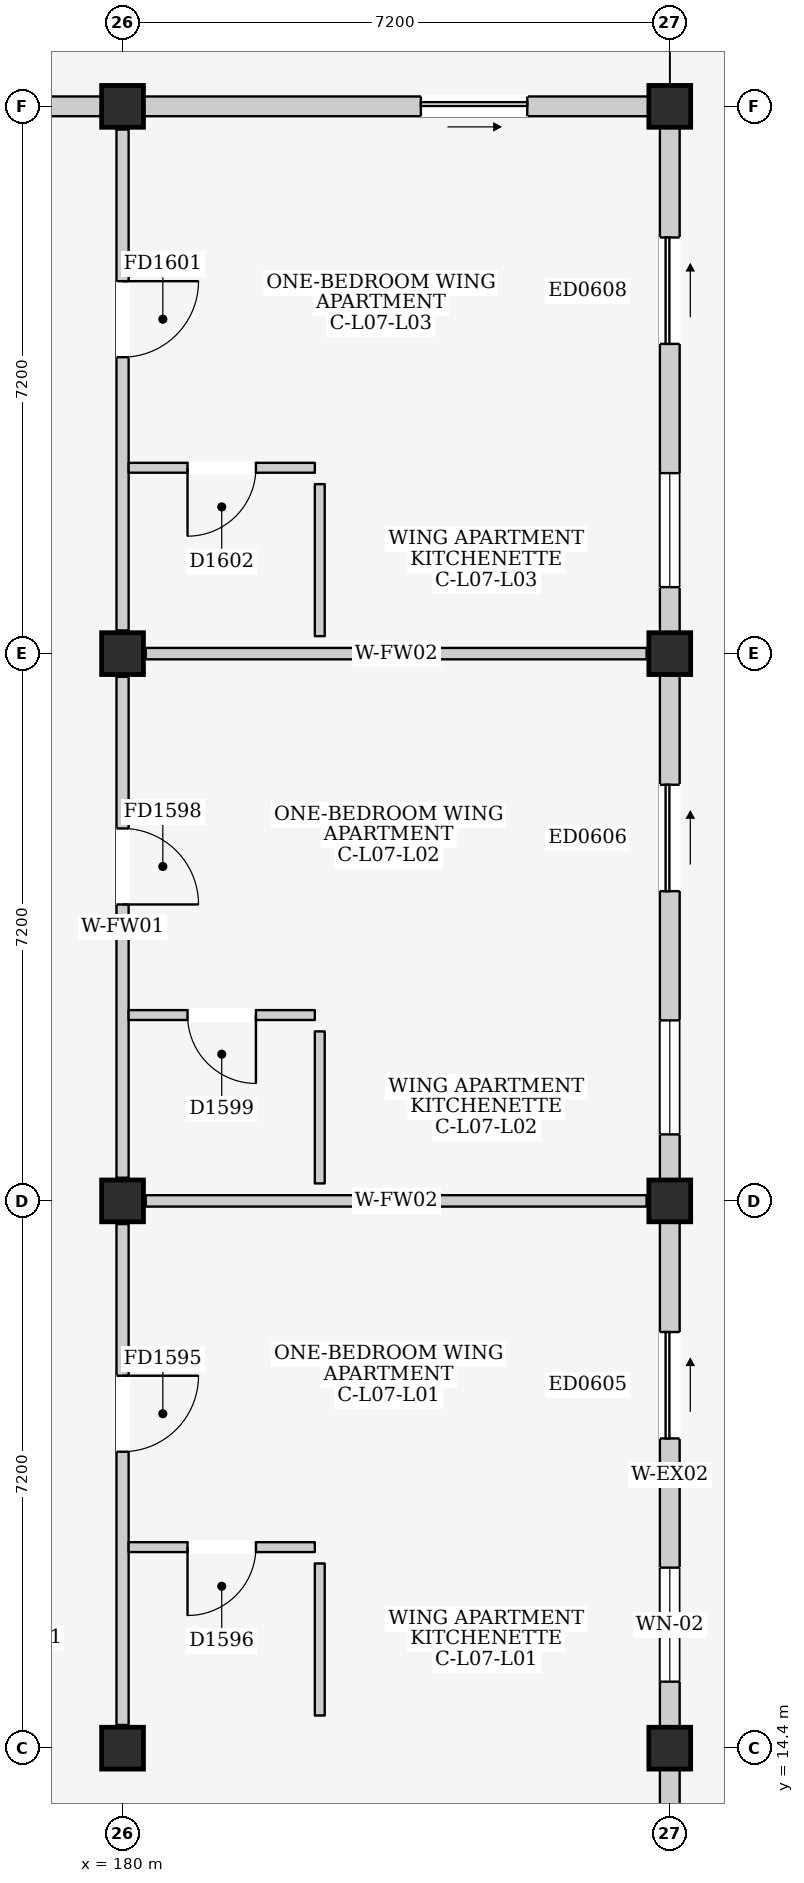
"""IFC4 building model, lengths in metres.
Left out: names, types, materials, properties, quantities, classifications, styles, units other than length and angle.
Written with IfcOpenShell. Run it as: python <this file> out.ifc"""

import sys

from ifc_helpers import new_model, si_unit, direction, frame, frame_2d, origin, origin_2d, place, context, subcontext, project, spatial, rectangle, extrude, element, fill, save


model = new_model("IFC4")
c1 = context("Model", 3, precision=1e-05, world=origin(), true_north=direction((0.0, 1.0)))
c2 = subcontext(c1, "Body", "Model", "MODEL_VIEW")
j1 = project(units=[si_unit("LENGTHUNIT", "METRE"), si_unit("PLANEANGLEUNIT", "RADIAN")], contexts=[c1])
p1 = place(None, origin())
s1 = spatial("IfcSite", under=j1, at=p1, CompositionType="ELEMENT")
p2 = place(p1, origin())
s2 = spatial("IfcBuilding", under=s1, at=p2, CompositionType="ELEMENT")
p3 = place(p2, frame((0.0, 0.0, 25.1)))
s3 = spatial("IfcBuildingStorey", under=s2, at=p3, CompositionType="ELEMENT", Elevation=25.1)
for number, where, z_axis, x_axis in (
    (1, (180.0, 14.4, 0.0), (0.0, 0.0, 1.0), (1.0, 0.0, 0.0)),
    (2, (180.0, 21.6, 0.0), (0.0, 0.0, 1.0), (1.0, 0.0, 0.0)),
    (3, (180.0, 28.8, 0.0), (0.0, 0.0, 1.0), (1.0, 0.0, 0.0)),
    (4, (180.0, 36.0, 0.0), (0.0, 0.0, 1.0), (1.0, 0.0, 0.0)),
    (5, (187.2, 14.4, 0.0), (0.0, 0.0, 1.0), (1.0, 0.0, 0.0)),
    (6, (187.2, 21.6, 0.0), (0.0, 0.0, 1.0), (1.0, 0.0, 0.0)),
    (7, (187.2, 28.8, 0.0), (0.0, 0.0, 1.0), (1.0, 0.0, 0.0)),
    (8, (187.2, 36.0, 0.0), (0.0, 0.0, 1.0), (1.0, 0.0, 0.0)),
):
    element("IfcColumn", number, at=place(p3, frame(where, z_axis=z_axis, x_axis=x_axis)), inside=s3, PredefinedType="COLUMN", context=c2, shape_type="SweptSolid", body=[
        extrude(rectangle(XDim=0.55, YDim=0.55, at=origin_2d()), origin(), (0.0, 0.0, 1.0), 3.2),
    ])
p4 = place(p3, frame((173.075, 36.0, 0.0), z_axis=(0.0, 0.0, 1.0), x_axis=(1.0, 0.0, 0.0)))
e9 = element("IfcWall", 9, at=p4, inside=s3, PredefinedType="ELEMENTEDWALL", context=c2, shape_type="SweptSolid", body=[
    extrude(rectangle(XDim=6.65, YDim=0.26, at=frame_2d((3.325, 0.0))), origin(), (0.0, 0.0, 1.0), 2.375),
])
p5 = place(p4, frame((2.825, 0.0, 1.1)))
e10 = element("IfcOpeningElement", 10, at=p5, cuts=e9, PredefinedType="OPENING", context=c2, shape_type="SweptSolid", body=[
    extrude(rectangle(XDim=1.0, YDim=0.9, at=frame_2d((0.5, 0.45))), frame((0.0, 0.145, 0.0), z_axis=(0.0, -1.0, 0.0), x_axis=(1.0, 0.0, 0.0)), (0.0, 0.0, 1.0), 0.29),
])
p6 = place(p3, frame((187.2, 7.475, 0.0), z_axis=(0.0, 0.0, 1.0), x_axis=(0.0, 1.0, 0.0)))
e11 = element("IfcWall", 11, at=p6, inside=s3, PredefinedType="ELEMENTEDWALL", context=c2, shape_type="SweptSolid", body=[
    extrude(rectangle(XDim=6.65, YDim=0.26, at=frame_2d((3.325, 0.0))), origin(), (0.0, 0.0, 1.0), 2.525),
])
p7 = place(p6, frame((3.65, 0.0, 0.0)))
e12 = element("IfcOpeningElement", 12, at=p7, cuts=e11, PredefinedType="OPENING", context=c2, shape_type="SweptSolid", body=[
    extrude(rectangle(XDim=1.4, YDim=2.1, at=frame_2d((0.7, 1.05))), frame((0.0, 0.145, 0.0), z_axis=(0.0, -1.0, 0.0), x_axis=(1.0, 0.0, 0.0)), (0.0, 0.0, 1.0), 0.29),
])
p8 = place(p3, frame((187.2, 14.675, 0.0), z_axis=(0.0, 0.0, 1.0), x_axis=(0.0, 1.0, 0.0)))
e13 = element("IfcWall", 13, at=p8, inside=s3, PredefinedType="ELEMENTEDWALL", context=c2, shape_type="SweptSolid", body=[
    extrude(rectangle(XDim=6.65, YDim=0.26, at=frame_2d((3.325, 0.0))), origin(), (0.0, 0.0, 1.0), 2.525),
])
p9 = place(p8, frame((3.8, 0.0, 0.0)))
e14 = element("IfcOpeningElement", 14, at=p9, cuts=e13, PredefinedType="OPENING", context=c2, shape_type="SweptSolid", body=[
    extrude(rectangle(XDim=1.4, YDim=2.1, at=frame_2d((0.7, 1.05))), frame((0.0, 0.145, 0.0), z_axis=(0.0, -1.0, 0.0), x_axis=(1.0, 0.0, 0.0)), (0.0, 0.0, 1.0), 0.29),
])
p10 = place(p8, frame((0.6, 0.0, 0.915)))
e15 = element("IfcOpeningElement", 15, at=p10, cuts=e13, PredefinedType="OPENING", context=c2, shape_type="SweptSolid", body=[
    extrude(rectangle(XDim=1.5, YDim=1.5, at=frame_2d((0.75, 0.75))), frame((0.0, 0.145, 0.0), z_axis=(0.0, -1.0, 0.0), x_axis=(1.0, 0.0, 0.0)), (0.0, 0.0, 1.0), 0.29),
])
p11 = place(p3, frame((187.2, 21.875, 0.0), z_axis=(0.0, 0.0, 1.0), x_axis=(0.0, 1.0, 0.0)))
e16 = element("IfcWall", 16, at=p11, inside=s3, PredefinedType="ELEMENTEDWALL", context=c2, shape_type="SweptSolid", body=[
    extrude(rectangle(XDim=6.65, YDim=0.26, at=frame_2d((3.325, 0.0))), origin(), (0.0, 0.0, 1.0), 2.525),
])
p12 = place(p11, frame((3.8, 0.0, 0.0)))
e17 = element("IfcOpeningElement", 17, at=p12, cuts=e16, PredefinedType="OPENING", context=c2, shape_type="SweptSolid", body=[
    extrude(rectangle(XDim=1.4, YDim=2.1, at=frame_2d((0.7, 1.05))), frame((0.0, 0.145, 0.0), z_axis=(0.0, -1.0, 0.0), x_axis=(1.0, 0.0, 0.0)), (0.0, 0.0, 1.0), 0.29),
])
p13 = place(p11, frame((0.6, 0.0, 0.915)))
e18 = element("IfcOpeningElement", 18, at=p13, cuts=e16, PredefinedType="OPENING", context=c2, shape_type="SweptSolid", body=[
    extrude(rectangle(XDim=1.5, YDim=1.5, at=frame_2d((0.75, 0.75))), frame((0.0, 0.145, 0.0), z_axis=(0.0, -1.0, 0.0), x_axis=(1.0, 0.0, 0.0)), (0.0, 0.0, 1.0), 0.29),
])
p14 = place(p3, frame((180.275, 36.0, 0.0), z_axis=(0.0, 0.0, 1.0), x_axis=(1.0, 0.0, 0.0)))
e19 = element("IfcWall", 19, at=p14, inside=s3, PredefinedType="ELEMENTEDWALL", context=c2, shape_type="SweptSolid", body=[
    extrude(rectangle(XDim=6.65, YDim=0.26, at=frame_2d((3.325, 0.0))), origin(), (0.0, 0.0, 1.0), 2.375),
])
p15 = place(p14, frame((3.65, 0.0, 0.0)))
e20 = element("IfcOpeningElement", 20, at=p15, cuts=e19, PredefinedType="OPENING", context=c2, shape_type="SweptSolid", body=[
    extrude(rectangle(XDim=1.4, YDim=2.1, at=frame_2d((0.7, 1.05))), frame((0.0, 0.145, 0.0), z_axis=(0.0, -1.0, 0.0), x_axis=(1.0, 0.0, 0.0)), (0.0, 0.0, 1.0), 0.29),
])
p16 = place(p3, frame((187.2, 29.075, 0.0), z_axis=(0.0, 0.0, 1.0), x_axis=(0.0, 1.0, 0.0)))
e21 = element("IfcWall", 21, at=p16, inside=s3, PredefinedType="ELEMENTEDWALL", context=c2, shape_type="SweptSolid", body=[
    extrude(rectangle(XDim=6.65, YDim=0.26, at=frame_2d((3.325, 0.0))), origin(), (0.0, 0.0, 1.0), 2.525),
])
p17 = place(p16, frame((3.8, 0.0, 0.0)))
e22 = element("IfcOpeningElement", 22, at=p17, cuts=e21, PredefinedType="OPENING", context=c2, shape_type="SweptSolid", body=[
    extrude(rectangle(XDim=1.4, YDim=2.1, at=frame_2d((0.7, 1.05))), frame((0.0, 0.145, 0.0), z_axis=(0.0, -1.0, 0.0), x_axis=(1.0, 0.0, 0.0)), (0.0, 0.0, 1.0), 0.29),
])
p18 = place(p16, frame((0.6, 0.0, 0.915)))
e23 = element("IfcOpeningElement", 23, at=p18, cuts=e21, PredefinedType="OPENING", context=c2, shape_type="SweptSolid", body=[
    extrude(rectangle(XDim=1.5, YDim=1.5, at=frame_2d((0.75, 0.75))), frame((0.0, 0.145, 0.0), z_axis=(0.0, -1.0, 0.0), x_axis=(1.0, 0.0, 0.0)), (0.0, 0.0, 1.0), 0.29),
])
p19 = place(p3, frame((180.0, 14.705, 0.0), z_axis=(0.0, 0.0, 1.0), x_axis=(0.0, 1.0, 0.0)))
e24 = element("IfcWall", 24, at=p19, inside=s3, PredefinedType="PARTITIONING", context=c2, shape_type="SweptSolid", body=[
    extrude(rectangle(XDim=6.59, YDim=0.16, at=frame_2d((3.295, 0.0))), origin(), (0.0, 0.0, 1.0), 2.475),
])
p20 = place(p19, frame((3.595, 0.0, 0.0)))
e25 = element("IfcOpeningElement", 25, at=p20, cuts=e24, PredefinedType="OPENING", context=c2, shape_type="SweptSolid", body=[
    extrude(rectangle(XDim=1.0, YDim=2.15, at=frame_2d((0.5, 1.075))), frame((0.0, 0.095, 0.0), z_axis=(0.0, -1.0, 0.0), x_axis=(1.0, 0.0, 0.0)), (0.0, 0.0, 1.0), 0.19),
])
p21 = place(p3, frame((180.305, 21.6, 0.0), z_axis=(0.0, 0.0, 1.0), x_axis=(1.0, 0.0, 0.0)))
e26 = element("IfcWall", 26, at=p21, inside=s3, PredefinedType="PARTITIONING", context=c2, shape_type="SweptSolid", body=[
    extrude(rectangle(XDim=6.59, YDim=0.15, at=frame_2d((3.295, 0.0))), origin(), (0.0, 0.0, 1.0), 2.375),
])
p22 = place(p3, frame((180.08, 17.045, 0.0), z_axis=(0.0, 0.0, 1.0), x_axis=(1.0, 0.0, 0.0)))
e27 = element("IfcWall", 27, at=p22, inside=s3, PredefinedType="PARTITIONING", context=c2, shape_type="SweptSolid", body=[
    extrude(rectangle(XDim=2.45, YDim=0.13, at=frame_2d((1.225, 0.0))), origin(), (0.0, 0.0, 1.0), 2.99),
])
p23 = place(p22, frame((0.775, 0.0, 0.0)))
e28 = element("IfcOpeningElement", 28, at=p23, cuts=e27, PredefinedType="OPENING", context=c2, shape_type="SweptSolid", body=[
    extrude(rectangle(XDim=0.9, YDim=2.1, at=frame_2d((0.45, 1.05))), frame((0.0, 0.08, 0.0), z_axis=(0.0, -1.0, 0.0), x_axis=(1.0, 0.0, 0.0)), (0.0, 0.0, 1.0), 0.16),
])
p24 = place(p3, frame((182.595, 14.83, 0.0), z_axis=(0.0, 0.0, 1.0), x_axis=(0.0, 1.0, 0.0)))
e29 = element("IfcWall", 29, at=p24, inside=s3, PredefinedType="PARTITIONING", context=c2, shape_type="SweptSolid", body=[
    extrude(rectangle(XDim=2.0, YDim=0.13, at=frame_2d((1.0, 0.0))), origin(), (0.0, 0.0, 1.0), 2.99),
])
p25 = place(p3, frame((180.0, 21.905, 0.0), z_axis=(0.0, 0.0, 1.0), x_axis=(0.0, 1.0, 0.0)))
e30 = element("IfcWall", 30, at=p25, inside=s3, PredefinedType="PARTITIONING", context=c2, shape_type="SweptSolid", body=[
    extrude(rectangle(XDim=6.59, YDim=0.16, at=frame_2d((3.295, 0.0))), origin(), (0.0, 0.0, 1.0), 2.475),
])
p26 = place(p25, frame((3.595, 0.0, 0.0)))
e31 = element("IfcOpeningElement", 31, at=p26, cuts=e30, PredefinedType="OPENING", context=c2, shape_type="SweptSolid", body=[
    extrude(rectangle(XDim=1.0, YDim=2.15, at=frame_2d((0.5, 1.075))), frame((0.0, 0.095, 0.0), z_axis=(0.0, -1.0, 0.0), x_axis=(1.0, 0.0, 0.0)), (0.0, 0.0, 1.0), 0.19),
])
p27 = place(p3, frame((180.305, 28.8, 0.0), z_axis=(0.0, 0.0, 1.0), x_axis=(1.0, 0.0, 0.0)))
e32 = element("IfcWall", 32, at=p27, inside=s3, PredefinedType="PARTITIONING", context=c2, shape_type="SweptSolid", body=[
    extrude(rectangle(XDim=6.59, YDim=0.15, at=frame_2d((3.295, 0.0))), origin(), (0.0, 0.0, 1.0), 2.375),
])
p28 = place(p3, frame((180.08, 24.045, 0.0), z_axis=(0.0, 0.0, 1.0), x_axis=(1.0, 0.0, 0.0)))
e33 = element("IfcWall", 33, at=p28, inside=s3, PredefinedType="PARTITIONING", context=c2, shape_type="SweptSolid", body=[
    extrude(rectangle(XDim=2.45, YDim=0.13, at=frame_2d((1.225, 0.0))), origin(), (0.0, 0.0, 1.0), 2.99),
])
p29 = place(p28, frame((0.775, 0.0, 0.0)))
e34 = element("IfcOpeningElement", 34, at=p29, cuts=e33, PredefinedType="OPENING", context=c2, shape_type="SweptSolid", body=[
    extrude(rectangle(XDim=0.9, YDim=2.1, at=frame_2d((0.45, 1.05))), frame((0.0, 0.08, 0.0), z_axis=(0.0, -1.0, 0.0), x_axis=(1.0, 0.0, 0.0)), (0.0, 0.0, 1.0), 0.16),
])
p30 = place(p3, frame((182.595, 21.83, 0.0), z_axis=(0.0, 0.0, 1.0), x_axis=(0.0, 1.0, 0.0)))
e35 = element("IfcWall", 35, at=p30, inside=s3, PredefinedType="PARTITIONING", context=c2, shape_type="SweptSolid", body=[
    extrude(rectangle(XDim=2.0, YDim=0.13, at=frame_2d((1.0, 0.0))), origin(), (0.0, 0.0, 1.0), 2.99),
])
p31 = place(p3, frame((180.0, 29.105, 0.0), z_axis=(0.0, 0.0, 1.0), x_axis=(0.0, 1.0, 0.0)))
e36 = element("IfcWall", 36, at=p31, inside=s3, PredefinedType="PARTITIONING", context=c2, shape_type="SweptSolid", body=[
    extrude(rectangle(XDim=6.59, YDim=0.16, at=frame_2d((3.295, 0.0))), origin(), (0.0, 0.0, 1.0), 2.475),
])
p32 = place(p31, frame((3.595, 0.0, 0.0)))
e37 = element("IfcOpeningElement", 37, at=p32, cuts=e36, PredefinedType="OPENING", context=c2, shape_type="SweptSolid", body=[
    extrude(rectangle(XDim=1.0, YDim=2.15, at=frame_2d((0.5, 1.075))), frame((0.0, 0.095, 0.0), z_axis=(0.0, -1.0, 0.0), x_axis=(1.0, 0.0, 0.0)), (0.0, 0.0, 1.0), 0.19),
])
p33 = place(p3, frame((180.08, 31.245, 0.0), z_axis=(0.0, 0.0, 1.0), x_axis=(1.0, 0.0, 0.0)))
e38 = element("IfcWall", 38, at=p33, inside=s3, PredefinedType="PARTITIONING", context=c2, shape_type="SweptSolid", body=[
    extrude(rectangle(XDim=2.45, YDim=0.13, at=frame_2d((1.225, 0.0))), origin(), (0.0, 0.0, 1.0), 2.99),
])
p34 = place(p33, frame((0.775, 0.0, 0.0)))
e39 = element("IfcOpeningElement", 39, at=p34, cuts=e38, PredefinedType="OPENING", context=c2, shape_type="SweptSolid", body=[
    extrude(rectangle(XDim=0.9, YDim=2.1, at=frame_2d((0.45, 1.05))), frame((0.0, 0.08, 0.0), z_axis=(0.0, -1.0, 0.0), x_axis=(1.0, 0.0, 0.0)), (0.0, 0.0, 1.0), 0.16),
])
p35 = place(p3, frame((182.595, 29.03, 0.0), z_axis=(0.0, 0.0, 1.0), x_axis=(0.0, 1.0, 0.0)))
e40 = element("IfcWall", 40, at=p35, inside=s3, PredefinedType="PARTITIONING", context=c2, shape_type="SweptSolid", body=[
    extrude(rectangle(XDim=2.0, YDim=0.13, at=frame_2d((1.0, 0.0))), origin(), (0.0, 0.0, 1.0), 2.99),
])
p36 = place(p9, frame((1.4, 0.0, 0.0), z_axis=(0.0, 0.0, 1.0), x_axis=(-1.0, 0.0, 0.0)))
e41 = element("IfcDoor", 41, at=p36, inside=s3, OperationType="SLIDING_TO_RIGHT", PredefinedType="DOOR", context=c2, shape_type="SweptSolid", body=[
    extrude(rectangle(XDim=1.4, YDim=2.1, at=frame_2d((0.7, 1.05))), frame((0.0, 0.025, 0.0), z_axis=(0.0, -1.0, 0.0), x_axis=(1.0, 0.0, 0.0)), (0.0, 0.0, 1.0), 0.05),
])
fill(e14, e41)
p37 = place(p10, origin())
e42 = element("IfcWindow", 42, at=p37, inside=s3, PartitioningType="DOUBLE_PANEL_VERTICAL", PredefinedType="WINDOW", context=c2, shape_type="SweptSolid", body=[
    extrude(rectangle(XDim=1.5, YDim=1.5, at=frame_2d((0.75, 0.75))), frame((0.0, 0.03, 0.0), z_axis=(0.0, -1.0, 0.0), x_axis=(1.0, 0.0, 0.0)), (0.0, 0.0, 1.0), 0.06),
])
fill(e15, e42)
p38 = place(p12, frame((1.4, 0.0, 0.0), z_axis=(0.0, 0.0, 1.0), x_axis=(-1.0, 0.0, 0.0)))
e43 = element("IfcDoor", 43, at=p38, inside=s3, OperationType="SLIDING_TO_RIGHT", PredefinedType="DOOR", context=c2, shape_type="SweptSolid", body=[
    extrude(rectangle(XDim=1.4, YDim=2.1, at=frame_2d((0.7, 1.05))), frame((0.0, 0.025, 0.0), z_axis=(0.0, -1.0, 0.0), x_axis=(1.0, 0.0, 0.0)), (0.0, 0.0, 1.0), 0.05),
])
fill(e17, e43)
p39 = place(p13, origin())
e44 = element("IfcWindow", 44, at=p39, inside=s3, PartitioningType="DOUBLE_PANEL_VERTICAL", PredefinedType="WINDOW", context=c2, shape_type="SweptSolid", body=[
    extrude(rectangle(XDim=1.5, YDim=1.5, at=frame_2d((0.75, 0.75))), frame((0.0, 0.03, 0.0), z_axis=(0.0, -1.0, 0.0), x_axis=(1.0, 0.0, 0.0)), (0.0, 0.0, 1.0), 0.06),
])
fill(e18, e44)
p40 = place(p15, frame((1.4, 0.0, 0.0), z_axis=(0.0, 0.0, 1.0), x_axis=(-1.0, 0.0, 0.0)))
e45 = element("IfcDoor", 45, at=p40, inside=s3, OperationType="SLIDING_TO_RIGHT", PredefinedType="DOOR", context=c2, shape_type="SweptSolid", body=[
    extrude(rectangle(XDim=1.4, YDim=2.1, at=frame_2d((0.7, 1.05))), frame((0.0, 0.025, 0.0), z_axis=(0.0, -1.0, 0.0), x_axis=(1.0, 0.0, 0.0)), (0.0, 0.0, 1.0), 0.05),
])
fill(e20, e45)
p41 = place(p17, frame((1.4, 0.0, 0.0), z_axis=(0.0, 0.0, 1.0), x_axis=(-1.0, 0.0, 0.0)))
e46 = element("IfcDoor", 46, at=p41, inside=s3, OperationType="SLIDING_TO_RIGHT", PredefinedType="DOOR", context=c2, shape_type="SweptSolid", body=[
    extrude(rectangle(XDim=1.4, YDim=2.1, at=frame_2d((0.7, 1.05))), frame((0.0, 0.025, 0.0), z_axis=(0.0, -1.0, 0.0), x_axis=(1.0, 0.0, 0.0)), (0.0, 0.0, 1.0), 0.05),
])
fill(e22, e46)
p42 = place(p18, origin())
e47 = element("IfcWindow", 47, at=p42, inside=s3, PartitioningType="DOUBLE_PANEL_VERTICAL", PredefinedType="WINDOW", context=c2, shape_type="SweptSolid", body=[
    extrude(rectangle(XDim=1.5, YDim=1.5, at=frame_2d((0.75, 0.75))), frame((0.0, 0.03, 0.0), z_axis=(0.0, -1.0, 0.0), x_axis=(1.0, 0.0, 0.0)), (0.0, 0.0, 1.0), 0.06),
])
fill(e23, e47)
p43 = place(p20, frame((1.0, 0.0, 0.0), z_axis=(0.0, 0.0, 1.0), x_axis=(-1.0, 0.0, 0.0)))
e48 = element("IfcDoor", 48, at=p43, inside=s3, OperationType="SINGLE_SWING_LEFT", PredefinedType="DOOR", context=c2, shape_type="SweptSolid", body=[
    extrude(rectangle(XDim=1.0, YDim=2.15, at=frame_2d((0.5, 1.075))), frame((0.0, 0.025, 0.0), z_axis=(0.0, -1.0, 0.0), x_axis=(1.0, 0.0, 0.0)), (0.0, 0.0, 1.0), 0.05),
])
fill(e25, e48)
p44 = place(p23, frame((0.9, 0.0, 0.0), z_axis=(0.0, 0.0, 1.0), x_axis=(-1.0, 0.0, 0.0)))
e49 = element("IfcDoor", 49, at=p44, inside=s3, OperationType="SINGLE_SWING_RIGHT", PredefinedType="DOOR", context=c2, shape_type="SweptSolid", body=[
    extrude(rectangle(XDim=0.9, YDim=2.1, at=frame_2d((0.45, 1.05))), frame((0.0, 0.025, 0.0), z_axis=(0.0, -1.0, 0.0), x_axis=(1.0, 0.0, 0.0)), (0.0, 0.0, 1.0), 0.05),
])
fill(e28, e49)
p45 = place(p26, frame((1.0, 0.0, 0.0), z_axis=(0.0, 0.0, 1.0), x_axis=(-1.0, 0.0, 0.0)))
e50 = element("IfcDoor", 50, at=p45, inside=s3, OperationType="SINGLE_SWING_RIGHT", PredefinedType="DOOR", context=c2, shape_type="SweptSolid", body=[
    extrude(rectangle(XDim=1.0, YDim=2.15, at=frame_2d((0.5, 1.075))), frame((0.0, 0.025, 0.0), z_axis=(0.0, -1.0, 0.0), x_axis=(1.0, 0.0, 0.0)), (0.0, 0.0, 1.0), 0.05),
])
fill(e31, e50)
p46 = place(p29, frame((0.9, 0.0, 0.0), z_axis=(0.0, 0.0, 1.0), x_axis=(-1.0, 0.0, 0.0)))
e51 = element("IfcDoor", 51, at=p46, inside=s3, OperationType="SINGLE_SWING_LEFT", PredefinedType="DOOR", context=c2, shape_type="SweptSolid", body=[
    extrude(rectangle(XDim=0.9, YDim=2.1, at=frame_2d((0.45, 1.05))), frame((0.0, 0.025, 0.0), z_axis=(0.0, -1.0, 0.0), x_axis=(1.0, 0.0, 0.0)), (0.0, 0.0, 1.0), 0.05),
])
fill(e34, e51)
p47 = place(p32, frame((1.0, 0.0, 0.0), z_axis=(0.0, 0.0, 1.0), x_axis=(-1.0, 0.0, 0.0)))
e52 = element("IfcDoor", 52, at=p47, inside=s3, OperationType="SINGLE_SWING_LEFT", PredefinedType="DOOR", context=c2, shape_type="SweptSolid", body=[
    extrude(rectangle(XDim=1.0, YDim=2.15, at=frame_2d((0.5, 1.075))), frame((0.0, 0.025, 0.0), z_axis=(0.0, -1.0, 0.0), x_axis=(1.0, 0.0, 0.0)), (0.0, 0.0, 1.0), 0.05),
])
fill(e37, e52)
p48 = place(p34, frame((0.9, 0.0, 0.0), z_axis=(0.0, 0.0, 1.0), x_axis=(-1.0, 0.0, 0.0)))
e53 = element("IfcDoor", 53, at=p48, inside=s3, OperationType="SINGLE_SWING_RIGHT", PredefinedType="DOOR", context=c2, shape_type="SweptSolid", body=[
    extrude(rectangle(XDim=0.9, YDim=2.1, at=frame_2d((0.45, 1.05))), frame((0.0, 0.025, 0.0), z_axis=(0.0, -1.0, 0.0), x_axis=(1.0, 0.0, 0.0)), (0.0, 0.0, 1.0), 0.05),
])
fill(e39, e53)
save(model, sys.argv[1])
